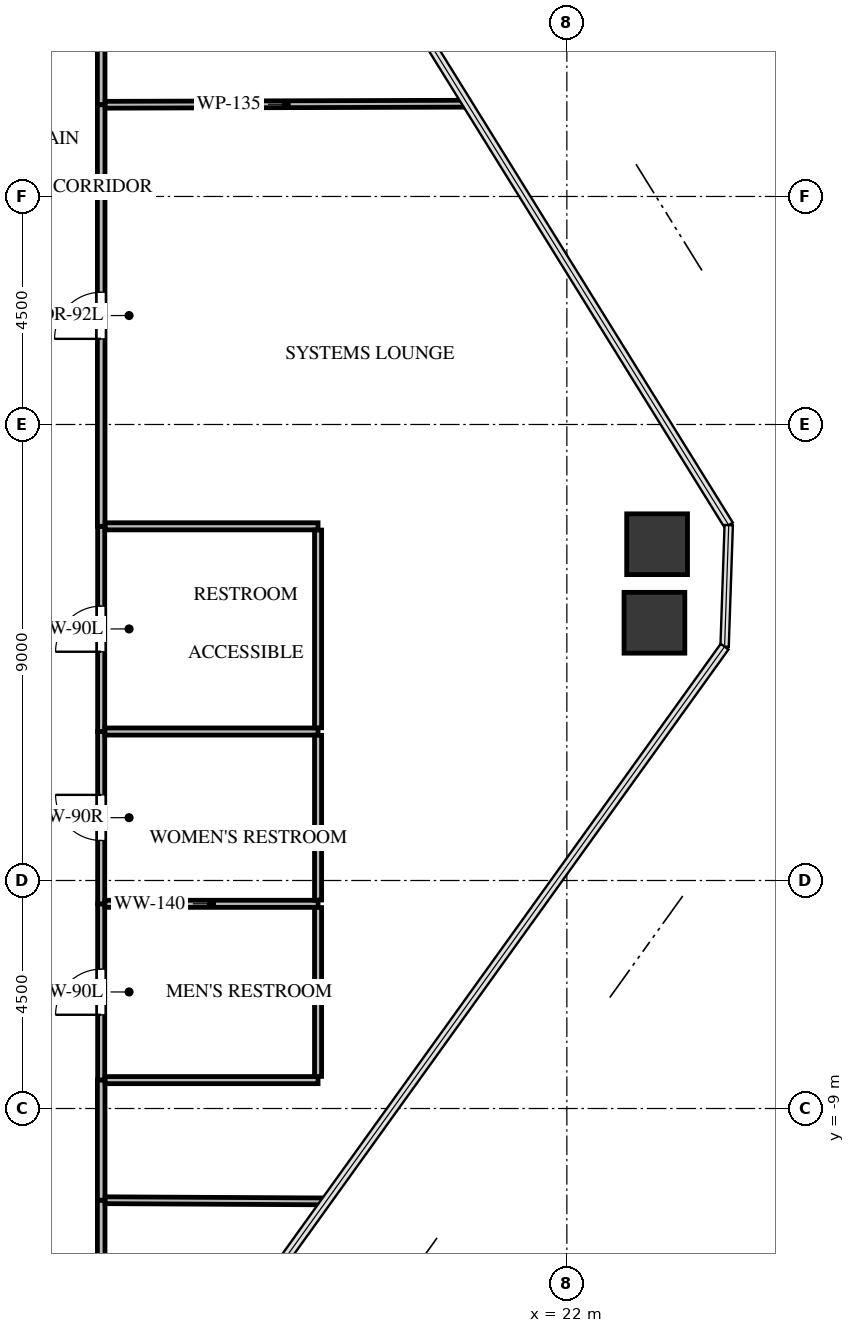
"""IFC4 building model, lengths in metres.
Left out: names, types, materials, properties, quantities, classifications, styles, units other than length and angle.
Written with IfcOpenShell. Run it as: python <this file> out.ifc"""

import sys

from ifc_helpers import new_model, si_unit, direction, frame, frame_2d, origin, origin_2d, place, context, subcontext, project, spatial, rectangle, extrude, source, transform, mapped, element, fill, save


model = new_model("IFC4")
c1 = context("Model", 3, precision=1e-05, world=origin(), true_north=direction((0.0, 1.0)))
c2 = subcontext(c1, "Body", "Model", "MODEL_VIEW")
j1 = project(units=[si_unit("LENGTHUNIT", "METRE"), si_unit("PLANEANGLEUNIT", "RADIAN")], contexts=[c1])
p1 = place(None, origin())
s1 = spatial("IfcSite", under=j1, at=p1, CompositionType="ELEMENT")
p2 = place(p1, origin())
s2 = spatial("IfcBuilding", under=s1, at=p2, CompositionType="ELEMENT")
p3 = place(p2, frame((0.0, 0.0, 104.1)))
s3 = spatial("IfcBuildingStorey", under=s2, at=p3, CompositionType="ELEMENT", Elevation=104.1)
m1 = source(origin(), c2, "Body", "SweptSolid", [
    extrude(rectangle(XDim=1.2, YDim=1.2, at=origin_2d()), origin(), (0.0, 0.0, 1.0), 3.3),
])
for number, where, z_axis, x_axis in (
    (1, (23.781, 2.137, -0.24), (0.0, 0.0, 1.0), (1.0, 0.0, 0.0)),
    (2, (23.728, 0.587, -0.24), (0.0, 0.0, 1.0), (1.0, 0.0, 0.0)),
):
    element("IfcColumn", number, at=place(p3, frame(where, z_axis=z_axis, x_axis=x_axis)), inside=s3, PredefinedType="COLUMN", context=c2, shape_type="MappedRepresentation", body=[
        mapped(m1, transform((0.0, 0.0, 0.0), x_axis=(1.0, 0.0, 0.0), y_axis=(0.0, 1.0, 0.0), z_axis=(0.0, 0.0, 1.0), scale=1.0)),
    ])
p4 = place(p3, frame((12.81, -8.44, 0.0), z_axis=(0.0, 0.0, 1.0), x_axis=(0.0, 1.0, 0.0)))
e3 = element("IfcWall", 3, at=p4, inside=s3, PredefinedType="PARTITIONING", context=c2, shape_type="SweptSolid", body=[
    extrude(rectangle(XDim=3.48, YDim=0.14, at=frame_2d((1.74, 0.0))), origin(), (0.0, 0.0, 1.0), 3.045),
])
p5 = place(p4, frame((1.29, 0.0, 0.0)))
e4 = element("IfcOpeningElement", 4, at=p5, cuts=e3, PredefinedType="OPENING", context=c2, shape_type="SweptSolid", body=[
    extrude(rectangle(XDim=0.9, YDim=2.05, at=frame_2d((0.45, 1.025))), frame((0.0, 0.08, 0.0), z_axis=(0.0, -1.0, 0.0), x_axis=(1.0, 0.0, 0.0)), (0.0, 0.0, 1.0), 0.16),
])
p6 = place(p3, frame((12.81, -4.96, 0.0), z_axis=(0.0, 0.0, 1.0), x_axis=(0.0, 1.0, 0.0)))
e5 = element("IfcWall", 5, at=p6, inside=s3, PredefinedType="PARTITIONING", context=c2, shape_type="SweptSolid", body=[
    extrude(rectangle(XDim=3.4, YDim=0.14, at=frame_2d((1.7, 0.0))), origin(), (0.0, 0.0, 1.0), 3.045),
])
p7 = place(p6, frame((1.25, 0.0, 0.0)))
e6 = element("IfcOpeningElement", 6, at=p7, cuts=e5, PredefinedType="OPENING", context=c2, shape_type="SweptSolid", body=[
    extrude(rectangle(XDim=0.9, YDim=2.05, at=frame_2d((0.45, 1.025))), frame((0.0, 0.08, 0.0), z_axis=(0.0, -1.0, 0.0), x_axis=(1.0, 0.0, 0.0)), (0.0, 0.0, 1.0), 0.16),
])
p8 = place(p3, frame((12.81, -1.56, 0.0), z_axis=(0.0, 0.0, 1.0), x_axis=(0.0, 1.0, 0.0)))
e7 = element("IfcWall", 7, at=p8, inside=s3, PredefinedType="PARTITIONING", context=c2, shape_type="SweptSolid", body=[
    extrude(rectangle(XDim=4.05, YDim=0.14, at=frame_2d((2.025, 0.0))), origin(), (0.0, 0.0, 1.0), 2.212),
])
p9 = place(p8, frame((1.575, 0.0, 0.0)))
e8 = element("IfcOpeningElement", 8, at=p9, cuts=e7, PredefinedType="OPENING", context=c2, shape_type="SweptSolid", body=[
    extrude(rectangle(XDim=0.9, YDim=2.05, at=frame_2d((0.45, 1.025))), frame((0.0, 0.08, 0.0), z_axis=(0.0, -1.0, 0.0), x_axis=(1.0, 0.0, 0.0)), (0.0, 0.0, 1.0), 0.16),
])
for number, where, z_axis, x_axis in (
    (9, (12.81, 10.81, 0.0), (0.0, 0.0, 1.0), (0.0, 1.0, 0.0)),
    (10, (12.81, -12.081, 0.0), (0.0, 0.0, 1.0), (0.0, 1.0, 0.0)),
):
    element("IfcWall", number, at=place(p3, frame(where, z_axis=z_axis, x_axis=x_axis)), inside=s3, PredefinedType="PARTITIONING", context=c2, shape_type="SweptSolid", body=[
        extrude(rectangle(XDim=1.271, YDim=0.15, at=frame_2d((0.635, 0.0))), origin(), (0.0, 0.0, 1.0), 3.045),
    ])
p10 = place(p3, frame((12.81, 2.49, 0.0), z_axis=(0.0, 0.0, 1.0), x_axis=(0.0, 1.0, 0.0)))
e11 = element("IfcWall", 11, at=p10, inside=s3, PredefinedType="PARTITIONING", context=c2, shape_type="SweptSolid", body=[
    extrude(rectangle(XDim=8.32, YDim=0.15, at=frame_2d((4.16, 0.0))), origin(), (0.0, 0.0, 1.0), 3.045),
])
p11 = place(p10, frame((3.7, 0.0, 0.0)))
e12 = element("IfcOpeningElement", 12, at=p11, cuts=e11, PredefinedType="OPENING", context=c2, shape_type="SweptSolid", body=[
    extrude(rectangle(XDim=0.92, YDim=2.1, at=frame_2d((0.46, 1.05))), frame((0.0, 0.085, 0.0), z_axis=(0.0, -1.0, 0.0), x_axis=(1.0, 0.0, 0.0)), (0.0, 0.0, 1.0), 0.17),
])
p12 = place(p3, frame((12.81, -10.81, 0.0), z_axis=(0.0, 0.0, 1.0), x_axis=(0.0, 1.0, 0.0)))
e13 = element("IfcWall", 13, at=p12, inside=s3, PredefinedType="PARTITIONING", context=c2, shape_type="SweptSolid", body=[
    extrude(rectangle(XDim=2.37, YDim=0.15, at=frame_2d((1.185, 0.0))), origin(), (0.0, 0.0, 1.0), 3.045),
])
p13 = place(p3, frame((12.884, -4.96, 0.0), z_axis=(0.0, 0.0, 1.0), x_axis=(1.0, 0.0, 0.0)))
e14 = element("IfcWall", 14, at=p13, inside=s3, PredefinedType="PARTITIONING", context=c2, shape_type="SweptSolid", body=[
    extrude(rectangle(XDim=4.206, YDim=0.14, at=frame_2d((2.103, 0.0))), origin(), (0.0, 0.0, 1.0), 3.045),
])
p14 = place(p3, frame((17.09, -8.44, 0.0), z_axis=(0.0, 0.0, 1.0), x_axis=(-1.0, 0.0, 0.0)))
e15 = element("IfcWall", 15, at=p14, inside=s3, PredefinedType="PARTITIONING", context=c2, shape_type="SweptSolid", body=[
    extrude(rectangle(XDim=4.201, YDim=0.14, at=frame_2d((2.101, 0.0))), origin(), (0.0, 0.0, 1.0), 2.38),
])
p15 = place(p3, frame((17.09, -5.034, 0.0), z_axis=(0.0, 0.0, 1.0), x_axis=(0.0, -1.0, 0.0)))
e16 = element("IfcWall", 16, at=p15, inside=s3, PredefinedType="PARTITIONING", context=c2, shape_type="SweptSolid", body=[
    extrude(rectangle(XDim=3.332, YDim=0.14, at=frame_2d((1.666, 0.0))), origin(), (0.0, 0.0, 1.0), 2.38),
])
p16 = place(p3, frame((12.884, -1.56, 0.0), z_axis=(0.0, 0.0, 1.0), x_axis=(1.0, 0.0, 0.0)))
e17 = element("IfcWall", 17, at=p16, inside=s3, PredefinedType="PARTITIONING", context=c2, shape_type="SweptSolid", body=[
    extrude(rectangle(XDim=4.206, YDim=0.14, at=frame_2d((2.103, 0.0))), origin(), (0.0, 0.0, 1.0), 3.045),
])
p17 = place(p3, frame((17.09, -1.634, 0.0), z_axis=(0.0, 0.0, 1.0), x_axis=(0.0, -1.0, 0.0)))
e18 = element("IfcWall", 18, at=p17, inside=s3, PredefinedType="PARTITIONING", context=c2, shape_type="SweptSolid", body=[
    extrude(rectangle(XDim=3.252, YDim=0.14, at=frame_2d((1.626, 0.0))), origin(), (0.0, 0.0, 1.0), 3.045),
])
p18 = place(p3, frame((12.889, 2.49, 0.0), z_axis=(0.0, 0.0, 1.0), x_axis=(1.0, 0.0, 0.0)))
e19 = element("IfcWall", 19, at=p18, inside=s3, PredefinedType="PARTITIONING", context=c2, shape_type="SweptSolid", body=[
    extrude(rectangle(XDim=4.201, YDim=0.14, at=frame_2d((2.101, 0.0))), origin(), (0.0, 0.0, 1.0), 3.045),
])
p19 = place(p3, frame((17.09, 2.416, 0.0), z_axis=(0.0, 0.0, 1.0), x_axis=(0.0, -1.0, 0.0)))
e20 = element("IfcWall", 20, at=p19, inside=s3, PredefinedType="PARTITIONING", context=c2, shape_type="SweptSolid", body=[
    extrude(rectangle(XDim=3.902, YDim=0.14, at=frame_2d((1.951, 0.0))), origin(), (0.0, 0.0, 1.0), 2.212),
])
p20 = place(p3, frame((20.035, 10.831, 0.0), z_axis=(0.0, 0.0, 1.0), x_axis=(-0.999995783715, -0.002903885812, 0.0)))
e21 = element("IfcWall", 21, at=p20, inside=s3, PredefinedType="PARTITIONING", context=c2, shape_type="SweptSolid", body=[
    extrude(rectangle(XDim=7.146, YDim=0.135, at=frame_2d((3.573, 0.0))), origin(), (0.0, 0.0, 1.0), 2.38),
])
p21 = place(p3, frame((12.889, -10.81, 0.0), z_axis=(0.0, 0.0, 1.0), x_axis=(0.999986140562, -0.005264853658, 0.0)))
e22 = element("IfcWall", 22, at=p21, inside=s3, PredefinedType="PARTITIONING", context=c2, shape_type="SweptSolid", body=[
    extrude(rectangle(XDim=4.359, YDim=0.135, at=frame_2d((2.179, 0.0))), origin(), (0.0, 0.0, 1.0), 2.38),
])
m2 = source(origin(), c2, "Body", "SweptSolid", [
    extrude(rectangle(XDim=0.9, YDim=2.05, at=frame_2d((0.45, 1.025))), frame((0.0, 0.025, 0.0), z_axis=(0.0, -1.0, 0.0), x_axis=(1.0, 0.0, 0.0)), (0.0, 0.0, 1.0), 0.05),
])
p22 = place(p5, origin())
e23 = element("IfcDoor", 23, at=p22, inside=s3, OperationType="SINGLE_SWING_LEFT", PredefinedType="DOOR", context=c2, shape_type="MappedRepresentation", body=[
    mapped(m2, transform((0.0, 0.0, 0.0), x_axis=(1.0, 0.0, 0.0), y_axis=(0.0, 1.0, 0.0), z_axis=(0.0, 0.0, 1.0), scale=1.0)),
])
fill(e4, e23)
m3 = source(origin(), c2, "Body", "SweptSolid", [
    extrude(rectangle(XDim=0.9, YDim=2.05, at=frame_2d((0.45, 1.025))), frame((0.0, 0.025, 0.0), z_axis=(0.0, -1.0, 0.0), x_axis=(1.0, 0.0, 0.0)), (0.0, 0.0, 1.0), 0.05),
])
p23 = place(p7, origin())
e24 = element("IfcDoor", 24, at=p23, inside=s3, OperationType="SINGLE_SWING_RIGHT", PredefinedType="DOOR", context=c2, shape_type="MappedRepresentation", body=[
    mapped(m3, transform((0.0, 0.0, 0.0), x_axis=(1.0, 0.0, 0.0), y_axis=(0.0, 1.0, 0.0), z_axis=(0.0, 0.0, 1.0), scale=1.0)),
])
fill(e6, e24)
p24 = place(p9, origin())
e25 = element("IfcDoor", 25, at=p24, inside=s3, OperationType="SINGLE_SWING_LEFT", PredefinedType="DOOR", context=c2, shape_type="MappedRepresentation", body=[
    mapped(m2, transform((0.0, 0.0, 0.0), x_axis=(1.0, 0.0, 0.0), y_axis=(0.0, 1.0, 0.0), z_axis=(0.0, 0.0, 1.0), scale=1.0)),
])
fill(e8, e25)
m4 = source(origin(), c2, "Body", "SweptSolid", [
    extrude(rectangle(XDim=0.92, YDim=2.1, at=frame_2d((0.46, 1.05))), frame((0.0, 0.025, 0.0), z_axis=(0.0, -1.0, 0.0), x_axis=(1.0, 0.0, 0.0)), (0.0, 0.0, 1.0), 0.05),
])
p25 = place(p11, origin())
e26 = element("IfcDoor", 26, at=p25, inside=s3, OperationType="SINGLE_SWING_LEFT", PredefinedType="DOOR", context=c2, shape_type="MappedRepresentation", body=[
    mapped(m4, transform((0.0, 0.0, 0.0), x_axis=(1.0, 0.0, 0.0), y_axis=(0.0, 1.0, 0.0), z_axis=(0.0, 0.0, 1.0), scale=1.0)),
])
fill(e12, e26)
save(model, sys.argv[1])
